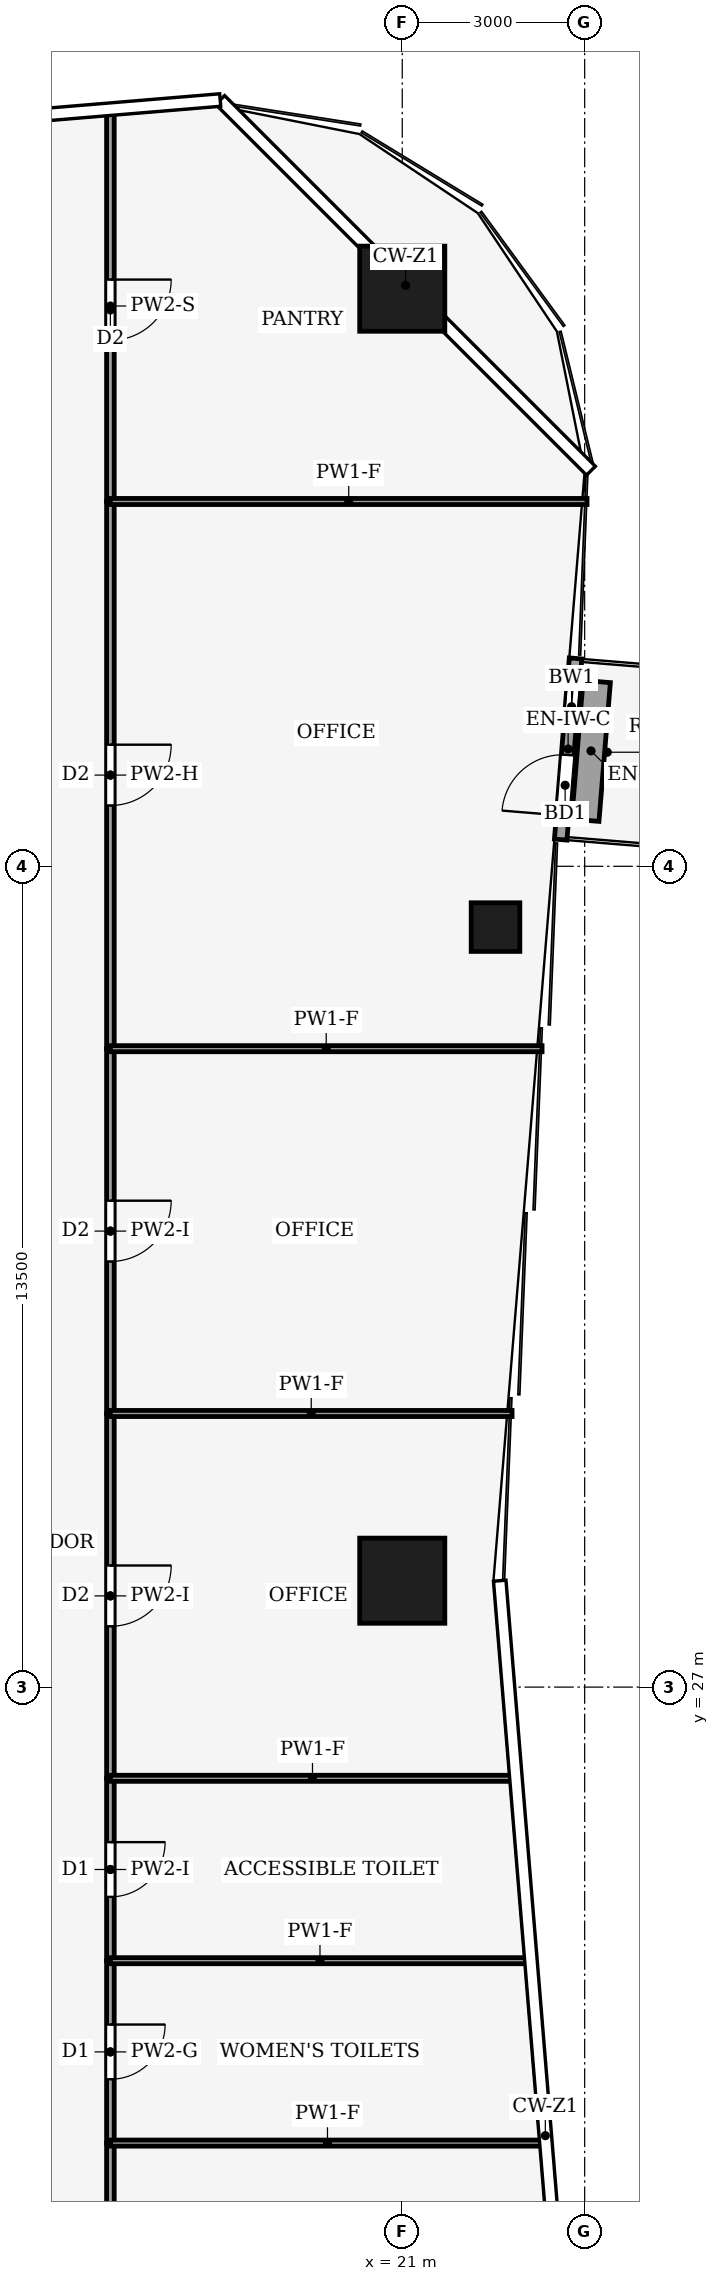
"""IFC4 building model, lengths in metres.
Left out: names, types, materials, properties, quantities, classifications, styles, units other than length and angle.
Written with IfcOpenShell. Run it as: python <this file> out.ifc"""

import sys

from ifc_helpers import new_model, si_unit, direction, frame, frame_2d, origin, origin_2d, place, context, subcontext, project, spatial, rectangle, hollow_rectangle, extrude, element, fill, save


model = new_model("IFC4")
c1 = context("Model", 3, precision=1e-05, world=origin(), true_north=direction((0.0, 1.0)))
c2 = subcontext(c1, "Body", "Model", "MODEL_VIEW")
j1 = project(units=[si_unit("LENGTHUNIT", "METRE"), si_unit("PLANEANGLEUNIT", "RADIAN")], contexts=[c1])
p1 = place(None, origin())
s1 = spatial("IfcSite", under=j1, at=p1, CompositionType="ELEMENT")
p2 = place(p1, origin())
s2 = spatial("IfcBuilding", under=s1, at=p2, CompositionType="ELEMENT")
p3 = place(p2, frame((0.0, 0.0, 86.0)))
s3 = spatial("IfcBuildingStorey", under=s2, at=p3, CompositionType="ELEMENT", Elevation=86.0)
for number, where, z_axis, x_axis in (
    (1, (21.0, 50.0, 0.0), (0.0, 0.0, 1.0), (1.0, 0.0, 0.0)),
    (2, (21.0, 28.75, 0.0), (0.0, 0.0, 1.0), (1.0, 0.0, 0.0)),
):
    element("IfcColumn", number, at=place(p3, frame(where, z_axis=z_axis, x_axis=x_axis)), inside=s3, PredefinedType="COLUMN", context=c2, shape_type="SweptSolid", body=[
        extrude(hollow_rectangle(XDim=1.4, YDim=1.4, WallThickness=0.08, at=origin_2d()), origin(), (0.0, 0.0, 1.0), 4.0),
    ])
p4 = place(p3, frame((22.534, 39.5, 0.0), z_axis=(0.0, 0.0, 1.0), x_axis=(1.0, 0.0, 0.0)))
e3 = element("IfcColumn", 3, at=p4, inside=s3, PredefinedType="COLUMN", context=c2, shape_type="SweptSolid", body=[
    extrude(hollow_rectangle(XDim=0.8, YDim=0.8, WallThickness=0.04, at=origin_2d()), origin(), (0.0, 0.0, 1.0), 4.0),
])
p5 = place(p3, frame((23.605, 40.939, 0.0), z_axis=(0.0, 0.0, 1.0), x_axis=(0.081903334605, 0.996640278024, 0.0)))
e4 = element("IfcWall", 4, at=p5, inside=s3, PredefinedType="SOLIDWALL", context=c2, shape_type="SweptSolid", body=[
    extrude(rectangle(XDim=2.99, YDim=0.206, at=frame_2d((1.495, 0.0))), origin(), (0.0, 0.0, 1.0), 3.65),
])
p6 = place(p5, frame((0.396, 0.0, 0.0)))
e5 = element("IfcOpeningElement", 5, at=p6, cuts=e4, PredefinedType="OPENING", context=c2, shape_type="SweptSolid", body=[
    extrude(rectangle(XDim=1.0, YDim=2.1, at=frame_2d((0.5, 1.05))), frame((0.0, 0.113, 0.0), z_axis=(0.0, -1.0, 0.0), x_axis=(1.0, 0.0, 0.0)), (0.0, 0.0, 1.0), 0.226),
])
p7 = place(p5, frame((1.793, 0.0, 0.9)))
e6 = element("IfcOpeningElement", 6, at=p7, cuts=e4, PredefinedType="OPENING", context=c2, shape_type="SweptSolid", body=[
    extrude(rectangle(XDim=0.8, YDim=1.2, at=frame_2d((0.4, 0.6))), frame((0.0, 0.113, 0.0), z_axis=(0.0, -1.0, 0.0), x_axis=(1.0, 0.0, 0.0)), (0.0, 0.0, 1.0), 0.226),
])
p8 = place(p3, frame((24.01, 41.257, 0.0), z_axis=(0.0, 0.0, 1.0), x_axis=(0.081986639556, 0.996633428566, 0.0)))
e7 = element("IfcWall", 7, at=p8, inside=s3, PredefinedType="USERDEFINED", context=c2, shape_type="SweptSolid", body=[
    extrude(rectangle(XDim=2.29, YDim=0.45, at=frame_2d((1.145, 0.0))), origin(), (0.0, 0.0, 1.0), 0.4),
])
p9 = place(p3, frame((16.2, 19.5, 0.0), z_axis=(0.0, 0.0, 1.0), x_axis=(0.0, -1.0, 0.0)))
e8 = element("IfcWall", 8, at=p9, inside=s3, PredefinedType="PARTITIONING", context=c2, shape_type="SweptSolid", body=[
    extrude(rectangle(XDim=3.0, YDim=0.125, at=frame_2d((1.5, 0.0))), origin(), (0.0, 0.0, 1.0), 3.14),
])
p10 = place(p9, frame((1.05, 0.0, 0.0)))
e9 = element("IfcOpeningElement", 9, at=p10, cuts=e8, PredefinedType="OPENING", context=c2, shape_type="SweptSolid", body=[
    extrude(rectangle(XDim=0.9, YDim=2.1, at=frame_2d((0.45, 1.05))), frame((0.0, 0.073, 0.0), z_axis=(0.0, -1.0, 0.0), x_axis=(1.0, 0.0, 0.0)), (0.0, 0.0, 1.0), 0.145),
])
p11 = place(p3, frame((16.2, 22.5, 0.0), z_axis=(0.0, 0.0, 1.0), x_axis=(0.0, -1.0, 0.0)))
e10 = element("IfcWall", 10, at=p11, inside=s3, PredefinedType="PARTITIONING", context=c2, shape_type="SweptSolid", body=[
    extrude(rectangle(XDim=3.0, YDim=0.125, at=frame_2d((1.5, 0.0))), origin(), (0.0, 0.0, 1.0), 3.87),
])
p12 = place(p11, frame((1.05, 0.0, 0.0)))
e11 = element("IfcOpeningElement", 11, at=p12, cuts=e10, PredefinedType="OPENING", context=c2, shape_type="SweptSolid", body=[
    extrude(rectangle(XDim=0.9, YDim=2.1, at=frame_2d((0.45, 1.05))), frame((0.0, 0.073, 0.0), z_axis=(0.0, -1.0, 0.0), x_axis=(1.0, 0.0, 0.0)), (0.0, 0.0, 1.0), 0.145),
])
p13 = place(p3, frame((16.2, 25.5, 0.0), z_axis=(0.0, 0.0, 1.0), x_axis=(0.0, -1.0, 0.0)))
e12 = element("IfcWall", 12, at=p13, inside=s3, PredefinedType="PARTITIONING", context=c2, shape_type="SweptSolid", body=[
    extrude(rectangle(XDim=3.0, YDim=0.125, at=frame_2d((1.5, 0.0))), origin(), (0.0, 0.0, 1.0), 3.48),
])
p14 = place(p13, frame((1.05, 0.0, 0.0)))
e13 = element("IfcOpeningElement", 13, at=p14, cuts=e12, PredefinedType="OPENING", context=c2, shape_type="SweptSolid", body=[
    extrude(rectangle(XDim=0.9, YDim=2.1, at=frame_2d((0.45, 1.05))), frame((0.0, 0.073, 0.0), z_axis=(0.0, -1.0, 0.0), x_axis=(1.0, 0.0, 0.0)), (0.0, 0.0, 1.0), 0.145),
])
p15 = place(p3, frame((16.2, 31.5, 0.0), z_axis=(0.0, 0.0, 1.0), x_axis=(0.0, -1.0, 0.0)))
e14 = element("IfcWall", 14, at=p15, inside=s3, PredefinedType="PARTITIONING", context=c2, shape_type="SweptSolid", body=[
    extrude(rectangle(XDim=6.0, YDim=0.125, at=frame_2d((3.0, 0.0))), origin(), (0.0, 0.0, 1.0), 3.48),
])
p16 = place(p15, frame((2.5, 0.0, 0.0)))
e15 = element("IfcOpeningElement", 15, at=p16, cuts=e14, PredefinedType="OPENING", context=c2, shape_type="SweptSolid", body=[
    extrude(rectangle(XDim=1.0, YDim=2.1, at=frame_2d((0.5, 1.05))), frame((0.0, 0.073, 0.0), z_axis=(0.0, -1.0, 0.0), x_axis=(1.0, 0.0, 0.0)), (0.0, 0.0, 1.0), 0.145),
])
p17 = place(p3, frame((16.2, 37.5, 0.0), z_axis=(0.0, 0.0, 1.0), x_axis=(0.0, -1.0, 0.0)))
e16 = element("IfcWall", 16, at=p17, inside=s3, PredefinedType="PARTITIONING", context=c2, shape_type="SweptSolid", body=[
    extrude(rectangle(XDim=6.0, YDim=0.125, at=frame_2d((3.0, 0.0))), origin(), (0.0, 0.0, 1.0), 3.48),
])
p18 = place(p17, frame((2.5, 0.0, 0.0)))
e17 = element("IfcOpeningElement", 17, at=p18, cuts=e16, PredefinedType="OPENING", context=c2, shape_type="SweptSolid", body=[
    extrude(rectangle(XDim=1.0, YDim=2.1, at=frame_2d((0.5, 1.05))), frame((0.0, 0.073, 0.0), z_axis=(0.0, -1.0, 0.0), x_axis=(1.0, 0.0, 0.0)), (0.0, 0.0, 1.0), 0.145),
])
p19 = place(p3, frame((16.2, 46.5, 0.0), z_axis=(0.0, 0.0, 1.0), x_axis=(0.0, -1.0, 0.0)))
e18 = element("IfcWall", 18, at=p19, inside=s3, PredefinedType="PARTITIONING", context=c2, shape_type="SweptSolid", body=[
    extrude(rectangle(XDim=9.0, YDim=0.125, at=frame_2d((4.5, 0.0))), origin(), (0.0, 0.0, 1.0), 3.14),
])
p20 = place(p19, frame((4.0, 0.0, 0.0)))
e19 = element("IfcOpeningElement", 19, at=p20, cuts=e18, PredefinedType="OPENING", context=c2, shape_type="SweptSolid", body=[
    extrude(rectangle(XDim=1.0, YDim=2.1, at=frame_2d((0.5, 1.05))), frame((0.0, 0.073, 0.0), z_axis=(0.0, -1.0, 0.0), x_axis=(1.0, 0.0, 0.0)), (0.0, 0.0, 1.0), 0.145),
])
p21 = place(p3, frame((16.2, 52.93, 0.0), z_axis=(0.0, 0.0, 1.0), x_axis=(0.0, -1.0, 0.0)))
e20 = element("IfcWall", 20, at=p21, inside=s3, PredefinedType="PARTITIONING", context=c2, shape_type="SweptSolid", body=[
    extrude(rectangle(XDim=6.43, YDim=0.125, at=frame_2d((3.215, 0.0))), origin(), (0.0, 0.0, 1.0), 3.04),
])
p22 = place(p21, frame((2.78, 0.0, 0.0)))
e21 = element("IfcOpeningElement", 21, at=p22, cuts=e20, PredefinedType="OPENING", context=c2, shape_type="SweptSolid", body=[
    extrude(rectangle(XDim=1.0, YDim=2.1, at=frame_2d((0.5, 1.05))), frame((0.0, 0.073, 0.0), z_axis=(0.0, -1.0, 0.0), x_axis=(1.0, 0.0, 0.0)), (0.0, 0.0, 1.0), 0.145),
])
p23 = place(p3, frame((23.34, 19.5, 0.0), z_axis=(0.0, 0.0, 1.0), x_axis=(-1.0, 0.0, 0.0)))
e22 = element("IfcWall", 22, at=p23, inside=s3, PredefinedType="PARTITIONING", context=c2, shape_type="SweptSolid", body=[
    extrude(rectangle(XDim=7.14, YDim=0.1, at=frame_2d((3.57, 0.0))), origin(), (0.0, 0.0, 1.0), 3.04),
])
p24 = place(p3, frame((23.094, 22.5, 0.0), z_axis=(0.0, 0.0, 1.0), x_axis=(-1.0, 0.0, 0.0)))
e23 = element("IfcWall", 23, at=p24, inside=s3, PredefinedType="PARTITIONING", context=c2, shape_type="SweptSolid", body=[
    extrude(rectangle(XDim=6.894, YDim=0.1, at=frame_2d((3.447, 0.0))), origin(), (0.0, 0.0, 1.0), 3.04),
])
p25 = place(p3, frame((22.847, 25.5, 0.0), z_axis=(0.0, 0.0, 1.0), x_axis=(-1.0, 0.0, 0.0)))
e24 = element("IfcWall", 24, at=p25, inside=s3, PredefinedType="PARTITIONING", context=c2, shape_type="SweptSolid", body=[
    extrude(rectangle(XDim=6.647, YDim=0.1, at=frame_2d((3.324, 0.0))), origin(), (0.0, 0.0, 1.0), 3.04),
])
p26 = place(p3, frame((22.806, 31.5, 0.0), z_axis=(0.0, 0.0, 1.0), x_axis=(-1.0, 0.0, 0.0)))
e25 = element("IfcWall", 25, at=p26, inside=s3, PredefinedType="PARTITIONING", context=c2, shape_type="SweptSolid", body=[
    extrude(rectangle(XDim=6.606, YDim=0.1, at=frame_2d((3.303, 0.0))), origin(), (0.0, 0.0, 1.0), 3.04),
])
p27 = place(p3, frame((23.299, 37.5, 0.0), z_axis=(0.0, 0.0, 1.0), x_axis=(-1.0, 0.0, 0.0)))
e26 = element("IfcWall", 26, at=p27, inside=s3, PredefinedType="PARTITIONING", context=c2, shape_type="SweptSolid", body=[
    extrude(rectangle(XDim=7.099, YDim=0.1, at=frame_2d((3.55, 0.0))), origin(), (0.0, 0.0, 1.0), 3.04),
])
p28 = place(p3, frame((24.039, 46.5, 0.0), z_axis=(0.0, 0.0, 1.0), x_axis=(-1.0, 0.0, 0.0)))
e27 = element("IfcWall", 27, at=p28, inside=s3, PredefinedType="PARTITIONING", context=c2, shape_type="SweptSolid", body=[
    extrude(rectangle(XDim=7.839, YDim=0.1, at=frame_2d((3.919, 0.0))), origin(), (0.0, 0.0, 1.0), 3.04),
])
p29 = place(p6, origin())
e28 = element("IfcDoor", 28, at=p29, inside=s3, OperationType="SINGLE_SWING_LEFT", PredefinedType="DOOR", context=c2, shape_type="SweptSolid", body=[
    extrude(rectangle(XDim=1.0, YDim=2.1, at=frame_2d((0.5, 1.05))), frame((0.0, 0.025, 0.0), z_axis=(0.0, -1.0, 0.0), x_axis=(1.0, 0.0, 0.0)), (0.0, 0.0, 1.0), 0.05),
])
fill(e5, e28)
p30 = place(p7, origin())
e29 = element("IfcWindow", 29, at=p30, inside=s3, PartitioningType="SINGLE_PANEL", PredefinedType="WINDOW", context=c2, shape_type="SweptSolid", body=[
    extrude(rectangle(XDim=0.8, YDim=1.2, at=frame_2d((0.4, 0.6))), frame((0.0, 0.03, 0.0), z_axis=(0.0, -1.0, 0.0), x_axis=(1.0, 0.0, 0.0)), (0.0, 0.0, 1.0), 0.06),
])
fill(e6, e29)
p31 = place(p12, origin())
e30 = element("IfcDoor", 30, at=p31, inside=s3, OperationType="SINGLE_SWING_LEFT", PredefinedType="DOOR", context=c2, shape_type="SweptSolid", body=[
    extrude(rectangle(XDim=0.9, YDim=2.1, at=frame_2d((0.45, 1.05))), frame((0.0, 0.025, 0.0), z_axis=(0.0, -1.0, 0.0), x_axis=(1.0, 0.0, 0.0)), (0.0, 0.0, 1.0), 0.05),
])
fill(e11, e30)
p32 = place(p14, origin())
e31 = element("IfcDoor", 31, at=p32, inside=s3, OperationType="SINGLE_SWING_RIGHT", PredefinedType="DOOR", context=c2, shape_type="SweptSolid", body=[
    extrude(rectangle(XDim=0.9, YDim=2.1, at=frame_2d((0.45, 1.05))), frame((0.0, 0.025, 0.0), z_axis=(0.0, -1.0, 0.0), x_axis=(1.0, 0.0, 0.0)), (0.0, 0.0, 1.0), 0.05),
])
fill(e13, e31)
p33 = place(p16, origin())
e32 = element("IfcDoor", 32, at=p33, inside=s3, OperationType="SINGLE_SWING_LEFT", PredefinedType="DOOR", context=c2, shape_type="SweptSolid", body=[
    extrude(rectangle(XDim=1.0, YDim=2.1, at=frame_2d((0.5, 1.05))), frame((0.0, 0.025, 0.0), z_axis=(0.0, -1.0, 0.0), x_axis=(1.0, 0.0, 0.0)), (0.0, 0.0, 1.0), 0.05),
])
fill(e15, e32)
p34 = place(p18, origin())
e33 = element("IfcDoor", 33, at=p34, inside=s3, OperationType="SINGLE_SWING_RIGHT", PredefinedType="DOOR", context=c2, shape_type="SweptSolid", body=[
    extrude(rectangle(XDim=1.0, YDim=2.1, at=frame_2d((0.5, 1.05))), frame((0.0, 0.025, 0.0), z_axis=(0.0, -1.0, 0.0), x_axis=(1.0, 0.0, 0.0)), (0.0, 0.0, 1.0), 0.05),
])
fill(e17, e33)
p35 = place(p20, origin())
e34 = element("IfcDoor", 34, at=p35, inside=s3, OperationType="SINGLE_SWING_LEFT", PredefinedType="DOOR", context=c2, shape_type="SweptSolid", body=[
    extrude(rectangle(XDim=1.0, YDim=2.1, at=frame_2d((0.5, 1.05))), frame((0.0, 0.025, 0.0), z_axis=(0.0, -1.0, 0.0), x_axis=(1.0, 0.0, 0.0)), (0.0, 0.0, 1.0), 0.05),
])
fill(e19, e34)
p36 = place(p22, origin())
e35 = element("IfcDoor", 35, at=p36, inside=s3, OperationType="SINGLE_SWING_RIGHT", PredefinedType="DOOR", context=c2, shape_type="SweptSolid", body=[
    extrude(rectangle(XDim=1.0, YDim=2.1, at=frame_2d((0.5, 1.05))), frame((0.0, 0.025, 0.0), z_axis=(0.0, -1.0, 0.0), x_axis=(1.0, 0.0, 0.0)), (0.0, 0.0, 1.0), 0.05),
])
fill(e21, e35)
save(model, sys.argv[1])
